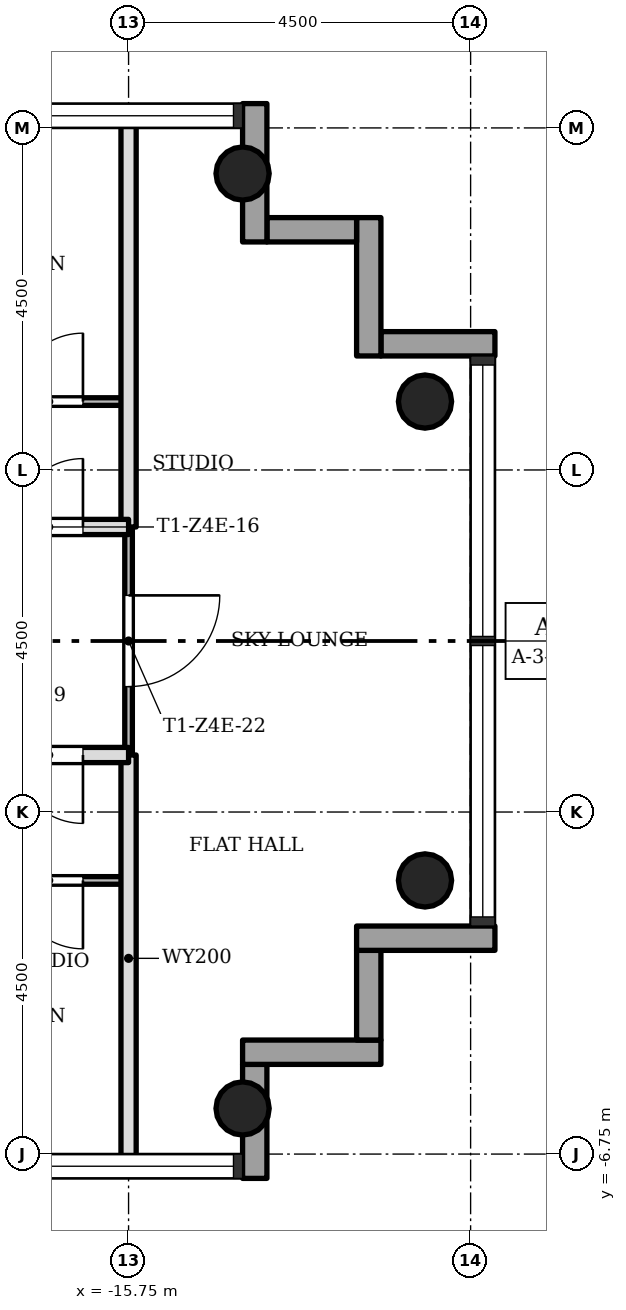
"""IFC4 building model, lengths in metres.
Left out: names, types, materials, properties, quantities, classifications, styles, units other than length and angle.
Written with IfcOpenShell. Run it as: python <this file> out.ifc"""

import sys

from ifc_helpers import new_model, si_unit, direction, frame, frame_2d, origin, origin_2d, place, context, subcontext, project, spatial, rectangle, hollow_circle, extrude, element, fill, save


model = new_model("IFC4")
c1 = context("Model", 3, precision=1e-05, world=origin(), true_north=direction((0.0, 1.0)))
c2 = subcontext(c1, "Body", "Model", "MODEL_VIEW")
j1 = project(units=[si_unit("LENGTHUNIT", "METRE"), si_unit("PLANEANGLEUNIT", "RADIAN")], contexts=[c1])
p1 = place(None, origin())
s1 = spatial("IfcSite", under=j1, at=p1, CompositionType="ELEMENT")
p2 = place(p1, origin())
s2 = spatial("IfcBuilding", under=s1, at=p2, CompositionType="ELEMENT")
p3 = place(p2, frame((0.0, 0.0, 213.0)))
s3 = spatial("IfcBuildingStorey", under=s2, at=p3, CompositionType="ELEMENT", Elevation=213.0)
for number, where, z_axis, x_axis in (
    (1, (-14.25, -6.15, 0.0), (0.0, 0.0, 1.0), (1.0, 0.0, 0.0)),
    (2, (-14.25, 6.15, 0.0), (0.0, 0.0, 1.0), (1.0, 0.0, 0.0)),
    (3, (-11.85, -3.15, 0.0), (0.0, 0.0, 1.0), (1.0, 0.0, 0.0)),
    (4, (-11.85, 3.15, 0.0), (0.0, 0.0, 1.0), (1.0, 0.0, 0.0)),
):
    element("IfcColumn", number, at=place(p3, frame(where, z_axis=z_axis, x_axis=x_axis)), inside=s3, PredefinedType="COLUMN", context=c2, shape_type="SweptSolid", body=[
        extrude(hollow_circle(Radius=0.35, WallThickness=0.025, at=origin_2d()), origin(), (0.0, 0.0, 1.0), 3.4),
    ])
p4 = place(p3, frame((-14.09, -7.07, -0.3), z_axis=(0.0, 0.0, 1.0), x_axis=(0.0, 1.0, 0.0)))
e5 = element("IfcWall", 5, at=p4, inside=s3, PredefinedType="STANDARD", context=c2, shape_type="SweptSolid", body=[
    extrude(rectangle(XDim=1.5, YDim=0.32, at=frame_2d((0.75, 0.0))), origin(), (0.0, 0.0, 1.0), 3.4),
])
p5 = place(p3, frame((-14.25, -5.41, -0.3), z_axis=(0.0, 0.0, 1.0), x_axis=(1.0, 0.0, 0.0)))
e6 = element("IfcWall", 6, at=p5, inside=s3, PredefinedType="STANDARD", context=c2, shape_type="SweptSolid", body=[
    extrude(rectangle(XDim=1.82, YDim=0.32, at=frame_2d((0.91, 0.0))), origin(), (0.0, 0.0, 1.0), 3.4),
])
p6 = place(p3, frame((-12.59, -5.25, -0.3), z_axis=(0.0, 0.0, 1.0), x_axis=(0.0, 1.0, 0.0)))
e7 = element("IfcWall", 7, at=p6, inside=s3, PredefinedType="STANDARD", context=c2, shape_type="SweptSolid", body=[
    extrude(rectangle(XDim=1.18, YDim=0.32, at=frame_2d((0.59, 0.0))), origin(), (0.0, 0.0, 1.0), 3.4),
])
p7 = place(p3, frame((-12.75, -3.91, -0.3), z_axis=(0.0, 0.0, 1.0), x_axis=(1.0, 0.0, 0.0)))
e8 = element("IfcWall", 8, at=p7, inside=s3, PredefinedType="STANDARD", context=c2, shape_type="SweptSolid", body=[
    extrude(rectangle(XDim=1.82, YDim=0.32, at=frame_2d((0.91, 0.0))), origin(), (0.0, 0.0, 1.0), 3.4),
])
p8 = place(p3, frame((-10.93, 3.91, -0.3), z_axis=(0.0, 0.0, 1.0), x_axis=(-1.0, 0.0, 0.0)))
e9 = element("IfcWall", 9, at=p8, inside=s3, PredefinedType="STANDARD", context=c2, shape_type="SweptSolid", body=[
    extrude(rectangle(XDim=1.5, YDim=0.32, at=frame_2d((0.75, 0.0))), origin(), (0.0, 0.0, 1.0), 3.4),
])
p9 = place(p3, frame((-12.59, 3.75, -0.3), z_axis=(0.0, 0.0, 1.0), x_axis=(0.0, 1.0, 0.0)))
e10 = element("IfcWall", 10, at=p9, inside=s3, PredefinedType="STANDARD", context=c2, shape_type="SweptSolid", body=[
    extrude(rectangle(XDim=1.82, YDim=0.32, at=frame_2d((0.91, 0.0))), origin(), (0.0, 0.0, 1.0), 3.4),
])
p10 = place(p3, frame((-12.75, 5.41, -0.3), z_axis=(0.0, 0.0, 1.0), x_axis=(-1.0, 0.0, 0.0)))
e11 = element("IfcWall", 11, at=p10, inside=s3, PredefinedType="STANDARD", context=c2, shape_type="SweptSolid", body=[
    extrude(rectangle(XDim=1.18, YDim=0.32, at=frame_2d((0.59, 0.0))), origin(), (0.0, 0.0, 1.0), 3.4),
])
p11 = place(p3, frame((-14.09, 5.25, -0.3), z_axis=(0.0, 0.0, 1.0), x_axis=(0.0, 1.0, 0.0)))
e12 = element("IfcWall", 12, at=p11, inside=s3, PredefinedType="STANDARD", context=c2, shape_type="SweptSolid", body=[
    extrude(rectangle(XDim=1.82, YDim=0.32, at=frame_2d((0.91, 0.0))), origin(), (0.0, 0.0, 1.0), 3.4),
])
p12 = place(p3, frame((-15.75, -1.5, 0.0), z_axis=(0.0, 0.0, 1.0), x_axis=(0.0, 1.0, 0.0)))
e13 = element("IfcWall", 13, at=p12, inside=s3, PredefinedType="PARTITIONING", context=c2, shape_type="SweptSolid", body=[
    extrude(rectangle(XDim=3.0, YDim=0.1, at=frame_2d((1.5, 0.0))), origin(), (0.0, 0.0, 1.0), 3.0),
])
p13 = place(p12, frame((0.9, 0.0, 0.0)))
e14 = element("IfcOpeningElement", 14, at=p13, cuts=e13, PredefinedType="OPENING", context=c2, shape_type="SweptSolid", body=[
    extrude(rectangle(XDim=1.2, YDim=2.1, at=frame_2d((0.6, 1.05))), frame((0.0, 0.06, 0.0), z_axis=(0.0, -1.0, 0.0), x_axis=(1.0, 0.0, 0.0)), (0.0, 0.0, 1.0), 0.12),
])
for number, where, z_axis, x_axis in (
    (15, (-15.75, -6.85, 0.0), (0.0, 0.0, 1.0), (0.0, 1.0, 0.0)),
    (16, (-15.75, 1.5, 0.0), (0.0, 0.0, 1.0), (0.0, 1.0, 0.0)),
):
    element("IfcWall", number, at=place(p3, frame(where, z_axis=z_axis, x_axis=x_axis)), inside=s3, PredefinedType="SOLIDWALL", context=c2, shape_type="SweptSolid", body=[
        extrude(rectangle(XDim=5.35, YDim=0.2, at=frame_2d((2.675, 0.0))), origin(), (0.0, 0.0, 1.0), 3.0),
    ])
p14 = place(p3, frame((-20.25, -3.15, 0.0), z_axis=(0.0, 0.0, 1.0), x_axis=(1.0, 0.0, 0.0)))
e17 = element("IfcWall", 17, at=p14, inside=s3, PredefinedType="PARTITIONING", context=c2, shape_type="SweptSolid", body=[
    extrude(rectangle(XDim=4.5, YDim=0.1, at=frame_2d((2.25, 0.0))), origin(), (0.0, 0.0, 1.0), 3.0),
])
p15 = place(p14, frame((3.0, 0.0, 0.0)))
e18 = element("IfcOpeningElement", 18, at=p15, cuts=e17, PredefinedType="OPENING", context=c2, shape_type="SweptSolid", body=[
    extrude(rectangle(XDim=0.9, YDim=2.1, at=frame_2d((0.45, 1.05))), frame((0.0, 0.06, 0.0), z_axis=(0.0, -1.0, 0.0), x_axis=(1.0, 0.0, 0.0)), (0.0, 0.0, 1.0), 0.12),
])
p16 = place(p3, frame((-20.25, -1.5, 0.0), z_axis=(0.0, 0.0, 1.0), x_axis=(1.0, 0.0, 0.0)))
e19 = element("IfcWall", 19, at=p16, inside=s3, PredefinedType="SOLIDWALL", context=c2, shape_type="SweptSolid", body=[
    extrude(rectangle(XDim=4.5, YDim=0.2, at=frame_2d((2.25, 0.0))), origin(), (0.0, 0.0, 1.0), 3.0),
])
p17 = place(p16, frame((3.0, 0.0, 0.0)))
e20 = element("IfcOpeningElement", 20, at=p17, cuts=e19, PredefinedType="OPENING", context=c2, shape_type="SweptSolid", body=[
    extrude(rectangle(XDim=0.9, YDim=2.1, at=frame_2d((0.45, 1.05))), frame((0.0, 0.11, 0.0), z_axis=(0.0, -1.0, 0.0), x_axis=(1.0, 0.0, 0.0)), (0.0, 0.0, 1.0), 0.22),
])
p18 = place(p3, frame((-20.25, 1.5, 0.0), z_axis=(0.0, 0.0, 1.0), x_axis=(1.0, 0.0, 0.0)))
e21 = element("IfcWall", 21, at=p18, inside=s3, PredefinedType="SOLIDWALL", context=c2, shape_type="SweptSolid", body=[
    extrude(rectangle(XDim=4.5, YDim=0.2, at=frame_2d((2.25, 0.0))), origin(), (0.0, 0.0, 1.0), 3.0),
])
p19 = place(p18, frame((3.0, 0.0, 0.0)))
e22 = element("IfcOpeningElement", 22, at=p19, cuts=e21, PredefinedType="OPENING", context=c2, shape_type="SweptSolid", body=[
    extrude(rectangle(XDim=0.9, YDim=2.1, at=frame_2d((0.45, 1.05))), frame((0.0, 0.11, 0.0), z_axis=(0.0, -1.0, 0.0), x_axis=(1.0, 0.0, 0.0)), (0.0, 0.0, 1.0), 0.22),
])
p20 = place(p3, frame((-20.25, 3.15, 0.0), z_axis=(0.0, 0.0, 1.0), x_axis=(1.0, 0.0, 0.0)))
e23 = element("IfcWall", 23, at=p20, inside=s3, PredefinedType="PARTITIONING", context=c2, shape_type="SweptSolid", body=[
    extrude(rectangle(XDim=4.5, YDim=0.1, at=frame_2d((2.25, 0.0))), origin(), (0.0, 0.0, 1.0), 3.0),
])
p21 = place(p20, frame((3.0, 0.0, 0.0)))
e24 = element("IfcOpeningElement", 24, at=p21, cuts=e23, PredefinedType="OPENING", context=c2, shape_type="SweptSolid", body=[
    extrude(rectangle(XDim=0.9, YDim=2.1, at=frame_2d((0.45, 1.05))), frame((0.0, 0.06, 0.0), z_axis=(0.0, -1.0, 0.0), x_axis=(1.0, 0.0, 0.0)), (0.0, 0.0, 1.0), 0.12),
])
p22 = place(p19, origin())
e25 = element("IfcDoor", 25, at=p22, inside=s3, OperationType="SINGLE_SWING_LEFT", PredefinedType="DOOR", context=c2, shape_type="SweptSolid", body=[
    extrude(rectangle(XDim=0.9, YDim=2.1, at=frame_2d((0.45, 1.05))), frame((0.0, 0.025, 0.0), z_axis=(0.0, -1.0, 0.0), x_axis=(1.0, 0.0, 0.0)), (0.0, 0.0, 1.0), 0.05),
])
fill(e22, e25)
p23 = place(p21, origin())
e26 = element("IfcDoor", 26, at=p23, inside=s3, OperationType="SINGLE_SWING_LEFT", PredefinedType="DOOR", context=c2, shape_type="SweptSolid", body=[
    extrude(rectangle(XDim=0.9, YDim=2.1, at=frame_2d((0.45, 1.05))), frame((0.0, 0.025, 0.0), z_axis=(0.0, -1.0, 0.0), x_axis=(1.0, 0.0, 0.0)), (0.0, 0.0, 1.0), 0.05),
])
fill(e24, e26)
p24 = place(p17, origin())
e27 = element("IfcDoor", 27, at=p24, inside=s3, OperationType="SINGLE_SWING_RIGHT", PredefinedType="DOOR", context=c2, shape_type="SweptSolid", body=[
    extrude(rectangle(XDim=0.9, YDim=2.1, at=frame_2d((0.45, 1.05))), frame((0.0, 0.025, 0.0), z_axis=(0.0, -1.0, 0.0), x_axis=(1.0, 0.0, 0.0)), (0.0, 0.0, 1.0), 0.05),
])
fill(e20, e27)
p25 = place(p15, origin())
e28 = element("IfcDoor", 28, at=p25, inside=s3, OperationType="SINGLE_SWING_RIGHT", PredefinedType="DOOR", context=c2, shape_type="SweptSolid", body=[
    extrude(rectangle(XDim=0.9, YDim=2.1, at=frame_2d((0.45, 1.05))), frame((0.0, 0.025, 0.0), z_axis=(0.0, -1.0, 0.0), x_axis=(1.0, 0.0, 0.0)), (0.0, 0.0, 1.0), 0.05),
])
fill(e18, e28)
p26 = place(p13, origin())
e29 = element("IfcDoor", 29, at=p26, inside=s3, OperationType="SINGLE_SWING_RIGHT", PredefinedType="DOOR", context=c2, shape_type="SweptSolid", body=[
    extrude(rectangle(XDim=1.2, YDim=2.1, at=frame_2d((0.6, 1.05))), frame((0.0, 0.025, 0.0), z_axis=(0.0, -1.0, 0.0), x_axis=(1.0, 0.0, 0.0)), (0.0, 0.0, 1.0), 0.05),
])
fill(e14, e29)
save(model, sys.argv[1])
